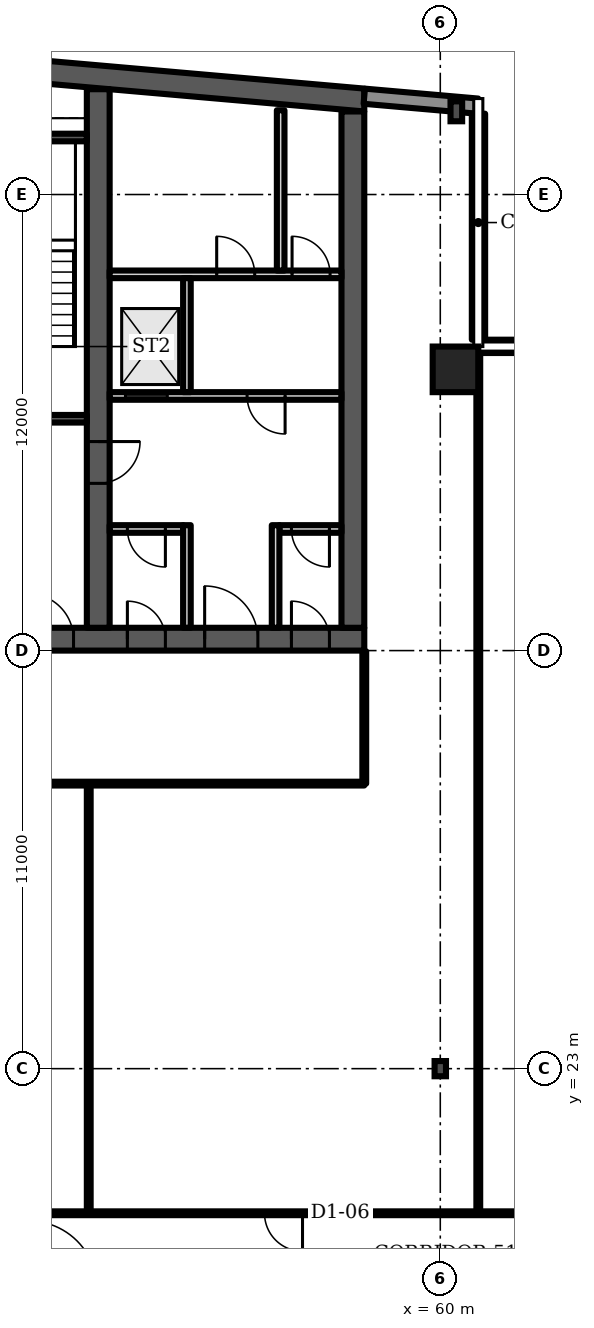
"""IFC4 building model, lengths in metres.
Left out: names, types, materials, properties, quantities, classifications, styles, units other than length and angle.
Written with IfcOpenShell. Run it as: python <this file> out.ifc"""

import sys

from ifc_helpers import new_model, si_unit, direction, frame, frame_2d, origin, origin_2d, place, context, subcontext, project, spatial, polyline, rectangle, i_section, outline, extrude, element, fill, save


model = new_model("IFC4")
c1 = context("Model", 3, precision=1e-05, world=origin(), true_north=direction((0.0, 1.0)))
c2 = subcontext(c1, "Body", "Model", "MODEL_VIEW")
j1 = project(units=[si_unit("LENGTHUNIT", "METRE"), si_unit("PLANEANGLEUNIT", "RADIAN")], contexts=[c1])
p1 = place(None, origin())
s1 = spatial("IfcSite", under=j1, at=p1, CompositionType="ELEMENT")
p2 = place(p1, origin())
s2 = spatial("IfcBuilding", under=s1, at=p2, CompositionType="ELEMENT")
p3 = place(p2, frame((0.0, 0.0, 207.1)))
s3 = spatial("IfcBuildingStorey", under=s2, at=p3, CompositionType="ELEMENT", Elevation=207.1)
p4 = place(p3, frame((0.0, 0.0, -0.0)))
e1 = element("IfcWall", 1, at=p4, inside=s3, PredefinedType="SHEAR", context=c2, shape_type="SweptSolid", body=[
    extrude(outline(polyline([(23.0, 48.185), (40.5, 49.716), (58.0, 48.185), (58.0, 48.787), (40.5, 50.318), (23.0, 48.787), (23.0, 48.185)])), origin(), (0.0, 0.0, 1.0), 3.6),
])
p5 = place(p3, frame((23.0, 34.3, 0.0), z_axis=(0.0, 0.0, 1.0), x_axis=(1.0, 0.0, 0.0)))
e2 = element("IfcWall", 2, at=p5, inside=s3, PredefinedType="SHEAR", context=c2, shape_type="SweptSolid", body=[
    extrude(rectangle(XDim=35.0, YDim=0.6, at=frame_2d((17.5, 0.0))), origin(), (0.0, 0.0, 1.0), 3.6),
])
p6 = place(p5, frame((0.65, 0.0, 0.0)))
e3 = element("IfcOpeningElement", 3, at=p6, cuts=e2, PredefinedType="OPENING", context=c2, shape_type="SweptSolid", body=[
    extrude(rectangle(XDim=1.2, YDim=2.1, at=frame_2d((0.6, 1.05))), frame((0.0, 0.31, 0.0), z_axis=(0.0, -1.0, 0.0), x_axis=(1.0, 0.0, 0.0)), (0.0, 0.0, 1.0), 0.62),
])
p7 = place(p5, frame((7.717, 0.0, 0.0)))
e4 = element("IfcOpeningElement", 4, at=p7, cuts=e2, PredefinedType="OPENING", context=c2, shape_type="SweptSolid", body=[
    extrude(rectangle(XDim=1.1, YDim=2.1, at=frame_2d((0.55, 1.05))), frame((0.0, 0.31, 0.0), z_axis=(0.0, -1.0, 0.0), x_axis=(1.0, 0.0, 0.0)), (0.0, 0.0, 1.0), 0.62),
])
p8 = place(p5, frame((12.183, 0.0, 0.0)))
e5 = element("IfcOpeningElement", 5, at=p8, cuts=e2, PredefinedType="OPENING", context=c2, shape_type="SweptSolid", body=[
    extrude(rectangle(XDim=1.1, YDim=2.1, at=frame_2d((0.55, 1.05))), frame((0.0, 0.31, 0.0), z_axis=(0.0, -1.0, 0.0), x_axis=(1.0, 0.0, 0.0)), (0.0, 0.0, 1.0), 0.62),
])
p9 = place(p5, frame((9.8, 0.0, 0.0)))
e6 = element("IfcOpeningElement", 6, at=p9, cuts=e2, PredefinedType="OPENING", context=c2, shape_type="SweptSolid", body=[
    extrude(rectangle(XDim=1.4, YDim=2.1, at=frame_2d((0.7, 1.05))), frame((0.0, 0.31, 0.0), z_axis=(0.0, -1.0, 0.0), x_axis=(1.0, 0.0, 0.0)), (0.0, 0.0, 1.0), 0.62),
])
p10 = place(p5, frame((14.717, 0.0, 0.0)))
e7 = element("IfcOpeningElement", 7, at=p10, cuts=e2, PredefinedType="OPENING", context=c2, shape_type="SweptSolid", body=[
    extrude(rectangle(XDim=1.1, YDim=2.1, at=frame_2d((0.55, 1.05))), frame((0.0, 0.31, 0.0), z_axis=(0.0, -1.0, 0.0), x_axis=(1.0, 0.0, 0.0)), (0.0, 0.0, 1.0), 0.62),
])
p11 = place(p5, frame((16.95, 0.0, 0.0)))
e8 = element("IfcOpeningElement", 8, at=p11, cuts=e2, PredefinedType="OPENING", context=c2, shape_type="SweptSolid", body=[
    extrude(rectangle(XDim=1.1, YDim=2.1, at=frame_2d((0.55, 1.05))), frame((0.0, 0.31, 0.0), z_axis=(0.0, -1.0, 0.0), x_axis=(1.0, 0.0, 0.0)), (0.0, 0.0, 1.0), 0.62),
])
p12 = place(p5, frame((19.183, 0.0, 0.0)))
e9 = element("IfcOpeningElement", 9, at=p12, cuts=e2, PredefinedType="OPENING", context=c2, shape_type="SweptSolid", body=[
    extrude(rectangle(XDim=1.1, YDim=2.1, at=frame_2d((0.55, 1.05))), frame((0.0, 0.31, 0.0), z_axis=(0.0, -1.0, 0.0), x_axis=(1.0, 0.0, 0.0)), (0.0, 0.0, 1.0), 0.62),
])
p13 = place(p5, frame((26.15, 0.0, 0.0)))
e10 = element("IfcOpeningElement", 10, at=p13, cuts=e2, PredefinedType="OPENING", context=c2, shape_type="SweptSolid", body=[
    extrude(rectangle(XDim=1.2, YDim=2.1, at=frame_2d((0.6, 1.05))), frame((0.0, 0.31, 0.0), z_axis=(0.0, -1.0, 0.0), x_axis=(1.0, 0.0, 0.0)), (0.0, 0.0, 1.0), 0.62),
])
p14 = place(p5, frame((28.767, 0.0, 0.0)))
e11 = element("IfcOpeningElement", 11, at=p14, cuts=e2, PredefinedType="OPENING", context=c2, shape_type="SweptSolid", body=[
    extrude(rectangle(XDim=1.0, YDim=2.1, at=frame_2d((0.5, 1.05))), frame((0.0, 0.31, 0.0), z_axis=(0.0, -1.0, 0.0), x_axis=(1.0, 0.0, 0.0)), (0.0, 0.0, 1.0), 0.62),
])
p15 = place(p5, frame((33.083, 0.0, 0.0)))
e12 = element("IfcOpeningElement", 12, at=p15, cuts=e2, PredefinedType="OPENING", context=c2, shape_type="SweptSolid", body=[
    extrude(rectangle(XDim=1.0, YDim=2.1, at=frame_2d((0.5, 1.05))), frame((0.0, 0.31, 0.0), z_axis=(0.0, -1.0, 0.0), x_axis=(1.0, 0.0, 0.0)), (0.0, 0.0, 1.0), 0.62),
])
p16 = place(p5, frame((30.8, 0.0, 0.0)))
e13 = element("IfcOpeningElement", 13, at=p16, cuts=e2, PredefinedType="OPENING", context=c2, shape_type="SweptSolid", body=[
    extrude(rectangle(XDim=1.4, YDim=2.1, at=frame_2d((0.7, 1.05))), frame((0.0, 0.31, 0.0), z_axis=(0.0, -1.0, 0.0), x_axis=(1.0, 0.0, 0.0)), (0.0, 0.0, 1.0), 0.62),
])
p17 = place(p3, frame((51.0, 34.6, 0.0), z_axis=(0.0, 0.0, 1.0), x_axis=(0.0, 1.0, 0.0)))
e14 = element("IfcWall", 14, at=p17, inside=s3, PredefinedType="SHEAR", context=c2, shape_type="SweptSolid", body=[
    extrude(rectangle(XDim=14.171, YDim=0.6, at=frame_2d((7.085, 0.0))), origin(), (0.0, 0.0, 1.0), 3.6),
])
p18 = place(p17, frame((3.8, 0.0, 0.0)))
e15 = element("IfcOpeningElement", 15, at=p18, cuts=e14, PredefinedType="OPENING", context=c2, shape_type="SweptSolid", body=[
    extrude(rectangle(XDim=1.1, YDim=2.1, at=frame_2d((0.55, 1.05))), frame((0.0, 0.31, 0.0), z_axis=(0.0, -1.0, 0.0), x_axis=(1.0, 0.0, 0.0)), (0.0, 0.0, 1.0), 0.62),
])
p19 = place(p3, frame((57.7, 34.6, 0.0), z_axis=(0.0, 0.0, 1.0), x_axis=(0.0, 1.0, 0.0)))
e16 = element("IfcWall", 16, at=p19, inside=s3, PredefinedType="SHEAR", context=c2, shape_type="SweptSolid", body=[
    extrude(rectangle(XDim=13.585, YDim=0.6, at=frame_2d((6.792, 0.0))), origin(), (0.0, 0.0, 1.0), 3.6),
])
p20 = place(p3, frame((60.4, 41.4, 0.0), z_axis=(0.0, 0.0, 1.0), x_axis=(1.0, 0.0, 0.0)))
e17 = element("IfcColumn", 17, at=p20, inside=s3, PredefinedType="COLUMN", context=c2, shape_type="SweptSolid", body=[
    extrude(rectangle(XDim=1.2, YDim=1.2, at=origin_2d()), origin(), (0.0, 0.0, 1.0), 3.6),
])
p21 = place(p3, frame((60.422, 48.189, 0.0), z_axis=(0.0, 0.0, 1.0), x_axis=(1.0, 0.0, 0.0)))
e18 = element("IfcColumn", 18, at=p21, inside=s3, PredefinedType="COLUMN", context=c2, shape_type="SweptSolid", body=[
    extrude(i_section(OverallWidth=0.306, OverallDepth=0.524, WebThickness=0.021, FlangeThickness=0.04, FilletRadius=0.027, at=origin_2d()), origin(), (0.0, 0.0, 1.0), 3.6),
])
p22 = place(p3, frame((60.0, 23.0, 0.0), z_axis=(0.0, 0.0, 1.0), x_axis=(1.0, 0.0, 0.0)))
e19 = element("IfcColumn", 19, at=p22, inside=s3, PredefinedType="COLUMN", context=c2, shape_type="SweptSolid", body=[
    extrude(i_section(OverallWidth=0.3, OverallDepth=0.4, WebThickness=0.013, FlangeThickness=0.024, FilletRadius=0.027, at=origin_2d()), origin(), (0.0, 0.0, 1.0), 3.6),
])
p23 = place(p3, frame((60.983, 48.326, 0.0), z_axis=(0.0, 0.0, 1.0), x_axis=(-0.996194, 0.087168, 0.0)))
e20 = element("IfcWall", 20, at=p23, inside=s3, PredefinedType="SOLIDWALL", context=c2, shape_type="SweptSolid", body=[
    extrude(rectangle(XDim=2.994, YDim=0.4, at=frame_2d((1.497, 0.0))), origin(), (0.0, 0.0, 1.0), 3.2),
])
p24 = place(p3, frame((68.803, 42.005, 0.0), z_axis=(0.0, 0.0, 1.0), x_axis=(-1.0, 0.0, 0.0)))
e21 = element("IfcWall", 21, at=p24, inside=s3, PredefinedType="SOLIDWALL", context=c2, shape_type="SweptSolid", body=[
    extrude(rectangle(XDim=7.803, YDim=0.35, at=frame_2d((3.902, 0.0))), origin(), (0.0, 0.0, 1.0), 1.0),
])
p25 = place(p3, frame((61.005, 42.18, 0.0), z_axis=(0.0, 0.0, 1.0), x_axis=(0.0, 1.0, 0.0)))
e22 = element("IfcWall", 22, at=p25, inside=s3, PredefinedType="SOLIDWALL", context=c2, shape_type="SweptSolid", body=[
    extrude(rectangle(XDim=5.947, YDim=0.35, at=frame_2d((2.973, 0.0))), origin(), (0.0, 0.0, 1.0), 1.0),
])
p26 = place(p3, frame((44.3, 40.1, 0.0), z_axis=(0.0, 0.0, 1.0), x_axis=(1.0, 0.0, 0.0)))
e23 = element("IfcWall", 23, at=p26, inside=s3, PredefinedType="SHEAR", context=c2, shape_type="SweptSolid", body=[
    extrude(rectangle(XDim=6.4, YDim=0.2, at=frame_2d((3.2, 0.0))), origin(), (0.0, 0.0, 1.0), 3.2),
])
p27 = place(p26, frame((3.625, 0.0, 0.0)))
e24 = element("IfcOpeningElement", 24, at=p27, cuts=e23, PredefinedType="OPENING", context=c2, shape_type="SweptSolid", body=[
    extrude(rectangle(XDim=1.2, YDim=2.1, at=frame_2d((0.6, 1.05))), frame((0.0, 0.11, 0.0), z_axis=(0.0, -1.0, 0.0), x_axis=(1.0, 0.0, 0.0)), (0.0, 0.0, 1.0), 0.22),
])
p28 = place(p26, frame((0.625, 0.0, 0.0)))
e25 = element("IfcOpeningElement", 25, at=p28, cuts=e23, PredefinedType="OPENING", context=c2, shape_type="SweptSolid", body=[
    extrude(rectangle(XDim=0.9, YDim=2.1, at=frame_2d((0.45, 1.05))), frame((0.0, 0.11, 0.0), z_axis=(0.0, -1.0, 0.0), x_axis=(1.0, 0.0, 0.0)), (0.0, 0.0, 1.0), 0.22),
])
p29 = place(p3, frame((46.75, 47.5, 0.0), z_axis=(0.0, 0.0, 1.0), x_axis=(1.0, 0.0, 0.0)))
e26 = element("IfcWall", 26, at=p29, inside=s3, PredefinedType="SHEAR", context=c2, shape_type="SweptSolid", body=[
    extrude(rectangle(XDim=3.95, YDim=0.2, at=frame_2d((1.975, 0.0))), origin(), (0.0, 0.0, 1.0), 3.2),
])
p30 = place(p3, frame((51.3, 37.2, 0.0), z_axis=(0.0, 0.0, 1.0), x_axis=(1.0, 0.0, 0.0)))
e27 = element("IfcWall", 27, at=p30, inside=s3, PredefinedType="PARTITIONING", context=c2, shape_type="SweptSolid", body=[
    extrude(rectangle(XDim=1.933, YDim=0.2, at=frame_2d((0.967, 0.0))), origin(), (0.0, 0.0, 1.0), 3.2),
])
p31 = place(p30, frame((0.467, 0.0, 0.0)))
e28 = element("IfcOpeningElement", 28, at=p31, cuts=e27, PredefinedType="OPENING", context=c2, shape_type="SweptSolid", body=[
    extrude(rectangle(XDim=1.0, YDim=2.1, at=frame_2d((0.5, 1.05))), frame((0.0, 0.11, 0.0), z_axis=(0.0, -1.0, 0.0), x_axis=(1.0, 0.0, 0.0)), (0.0, 0.0, 1.0), 0.22),
])
p32 = place(p3, frame((55.767, 37.2, 0.0), z_axis=(0.0, 0.0, 1.0), x_axis=(1.0, 0.0, 0.0)))
e29 = element("IfcWall", 29, at=p32, inside=s3, PredefinedType="PARTITIONING", context=c2, shape_type="SweptSolid", body=[
    extrude(rectangle(XDim=1.633, YDim=0.2, at=frame_2d((0.817, 0.0))), origin(), (0.0, 0.0, 1.0), 3.2),
])
p33 = place(p32, frame((0.317, 0.0, 0.0)))
e30 = element("IfcOpeningElement", 30, at=p33, cuts=e29, PredefinedType="OPENING", context=c2, shape_type="SweptSolid", body=[
    extrude(rectangle(XDim=1.0, YDim=2.1, at=frame_2d((0.5, 1.05))), frame((0.0, 0.11, 0.0), z_axis=(0.0, -1.0, 0.0), x_axis=(1.0, 0.0, 0.0)), (0.0, 0.0, 1.0), 0.22),
])
p34 = place(p3, frame((51.3, 40.7, 0.0), z_axis=(0.0, 0.0, 1.0), x_axis=(1.0, 0.0, 0.0)))
e31 = element("IfcWall", 31, at=p34, inside=s3, PredefinedType="PARTITIONING", context=c2, shape_type="SweptSolid", body=[
    extrude(rectangle(XDim=6.1, YDim=0.2, at=frame_2d((3.05, 0.0))), origin(), (0.0, 0.0, 1.0), 3.2),
])
p35 = place(p34, frame((0.417, 0.0, 0.0)))
e32 = element("IfcOpeningElement", 32, at=p35, cuts=e31, PredefinedType="OPENING", context=c2, shape_type="SweptSolid", body=[
    extrude(rectangle(XDim=1.1, YDim=2.1, at=frame_2d((0.55, 1.05))), frame((0.0, 0.11, 0.0), z_axis=(0.0, -1.0, 0.0), x_axis=(1.0, 0.0, 0.0)), (0.0, 0.0, 1.0), 0.22),
])
p36 = place(p34, frame((3.617, 0.0, 0.0)))
e33 = element("IfcOpeningElement", 33, at=p36, cuts=e31, PredefinedType="OPENING", context=c2, shape_type="SweptSolid", body=[
    extrude(rectangle(XDim=1.0, YDim=2.1, at=frame_2d((0.5, 1.05))), frame((0.0, 0.11, 0.0), z_axis=(0.0, -1.0, 0.0), x_axis=(1.0, 0.0, 0.0)), (0.0, 0.0, 1.0), 0.22),
])
p37 = place(p3, frame((51.3, 43.9, 0.0), z_axis=(0.0, 0.0, 1.0), x_axis=(1.0, 0.0, 0.0)))
e34 = element("IfcWall", 34, at=p37, inside=s3, PredefinedType="PARTITIONING", context=c2, shape_type="SweptSolid", body=[
    extrude(rectangle(XDim=6.1, YDim=0.2, at=frame_2d((3.05, 0.0))), origin(), (0.0, 0.0, 1.0), 3.2),
])
p38 = place(p37, frame((2.817, 0.0, 0.0)))
e35 = element("IfcOpeningElement", 35, at=p38, cuts=e34, PredefinedType="OPENING", context=c2, shape_type="SweptSolid", body=[
    extrude(rectangle(XDim=1.0, YDim=2.1, at=frame_2d((0.5, 1.05))), frame((0.0, 0.11, 0.0), z_axis=(0.0, -1.0, 0.0), x_axis=(1.0, 0.0, 0.0)), (0.0, 0.0, 1.0), 0.22),
])
p39 = place(p37, frame((4.8, 0.0, 0.0)))
e36 = element("IfcOpeningElement", 36, at=p39, cuts=e34, PredefinedType="OPENING", context=c2, shape_type="SweptSolid", body=[
    extrude(rectangle(XDim=1.0, YDim=2.1, at=frame_2d((0.5, 1.05))), frame((0.0, 0.11, 0.0), z_axis=(0.0, -1.0, 0.0), x_axis=(1.0, 0.0, 0.0)), (0.0, 0.0, 1.0), 0.22),
])
p40 = place(p3, frame((0.0, 0.0, -0.0)))
e37 = element("IfcWall", 37, at=p40, inside=s3, PredefinedType="PARTITIONING", context=c2, shape_type="SweptSolid", body=[
    extrude(outline(polyline([(53.233, 34.6), (53.233, 37.3), (53.433, 37.3), (53.433, 34.6), (53.233, 34.6)])), origin(), (0.0, 0.0, 1.0), 3.2),
])
p41 = place(p3, frame((0.0, 0.0, -0.0)))
e38 = element("IfcWall", 38, at=p41, inside=s3, PredefinedType="PARTITIONING", context=c2, shape_type="SweptSolid", body=[
    extrude(outline(polyline([(55.567, 34.6), (55.567, 37.3), (55.767, 37.3), (55.767, 34.6), (55.567, 34.6)])), origin(), (0.0, 0.0, 1.0), 3.2),
])
p42 = place(p3, frame((0.0, 0.0, -0.0)))
e39 = element("IfcWall", 39, at=p42, inside=s3, PredefinedType="PARTITIONING", context=c2, shape_type="SweptSolid", body=[
    extrude(outline(polyline([(53.433, 40.8), (53.433, 43.8), (53.233, 43.8), (53.233, 40.8), (53.433, 40.8)])), origin(), (0.0, 0.0, 1.0), 3.2),
])
p43 = place(p3, frame((55.8, 44.0, 0.0), z_axis=(0.0, 0.0, 1.0), x_axis=(0.0, 1.0, 0.0)))
e40 = element("IfcWall", 40, at=p43, inside=s3, PredefinedType="PARTITIONING", context=c2, shape_type="SweptSolid", body=[
    extrude(rectangle(XDim=4.218, YDim=0.2, at=frame_2d((2.109, 0.0))), origin(), (0.0, 0.0, 1.0), 3.2),
])
p44 = place(p3, frame((24.805, 19.195, 0.0), z_axis=(0.0, 0.0, 1.0), x_axis=(1.0, 0.0, 0.0)))
e41 = element("IfcWall", 41, at=p44, inside=s3, PredefinedType="PARTITIONING", context=c2, shape_type="SweptSolid", body=[
    extrude(rectangle(XDim=40.265, YDim=0.1, at=frame_2d((20.133, 0.0))), origin(), (0.0, 0.0, 1.0), 3.2),
])
p45 = place(p44, frame((4.945, 0.0, 0.0)))
e42 = element("IfcOpeningElement", 42, at=p45, cuts=e41, PredefinedType="OPENING", context=c2, shape_type="SweptSolid", body=[
    extrude(rectangle(XDim=1.0, YDim=2.1, at=frame_2d((0.5, 1.05))), frame((0.0, 0.06, 0.0), z_axis=(0.0, -1.0, 0.0), x_axis=(1.0, 0.0, 0.0)), (0.0, 0.0, 1.0), 0.12),
])
p46 = place(p44, frame((30.57, 0.0, 0.0)))
e43 = element("IfcOpeningElement", 43, at=p46, cuts=e41, PredefinedType="OPENING", context=c2, shape_type="SweptSolid", body=[
    extrude(rectangle(XDim=1.0, YDim=2.1, at=frame_2d((0.5, 1.05))), frame((0.0, 0.06, 0.0), z_axis=(0.0, -1.0, 0.0), x_axis=(1.0, 0.0, 0.0)), (0.0, 0.0, 1.0), 0.12),
])
p47 = place(p44, frame((16.02, 0.0, 0.0)))
e44 = element("IfcOpeningElement", 44, at=p47, cuts=e41, PredefinedType="OPENING", context=c2, shape_type="SweptSolid", body=[
    extrude(rectangle(XDim=1.1, YDim=2.1, at=frame_2d((0.55, 1.05))), frame((0.0, 0.06, 0.0), z_axis=(0.0, -1.0, 0.0), x_axis=(1.0, 0.0, 0.0)), (0.0, 0.0, 1.0), 0.12),
])
p48 = place(p3, frame((50.75, 19.2, 0.0), z_axis=(0.0, 0.0, 1.0), x_axis=(0.0, 1.0, 0.0)))
e45 = element("IfcWall", 45, at=p48, inside=s3, PredefinedType="PARTITIONING", context=c2, shape_type="SweptSolid", body=[
    extrude(rectangle(XDim=11.3, YDim=0.1, at=frame_2d((5.65, 0.0))), origin(), (0.0, 0.0, 1.0), 3.2),
])
p49 = place(p3, frame((58.0, 30.5, 0.0), z_axis=(0.0, 0.0, 1.0), x_axis=(0.0, 1.0, 0.0)))
e46 = element("IfcWall", 46, at=p49, inside=s3, PredefinedType="PARTITIONING", context=c2, shape_type="SweptSolid", body=[
    extrude(rectangle(XDim=3.48, YDim=0.1, at=frame_2d((1.74, 0.0))), origin(), (0.0, 0.0, 1.0), 3.2),
])
p50 = place(p3, frame((61.0, 19.2, 0.0), z_axis=(0.0, 0.0, 1.0), x_axis=(0.0, 1.0, 0.0)))
e47 = element("IfcWall", 47, at=p50, inside=s3, PredefinedType="PARTITIONING", context=c2, shape_type="SweptSolid", body=[
    extrude(rectangle(XDim=22.78, YDim=0.1, at=frame_2d((11.39, 0.0))), origin(), (0.0, 0.0, 1.0), 3.2),
])
p51 = place(p3, frame((44.15, 30.5, 0.0), z_axis=(0.0, 0.0, 1.0), x_axis=(1.0, 0.0, 0.0)))
e48 = element("IfcWall", 48, at=p51, inside=s3, PredefinedType="PARTITIONING", context=c2, shape_type="SweptSolid", body=[
    extrude(rectangle(XDim=13.85, YDim=0.1, at=frame_2d((6.925, 0.0))), origin(), (0.0, 0.0, 1.0), 3.2),
])
p52 = place(p51, frame((2.77, 0.0, 0.0)))
e49 = element("IfcOpeningElement", 49, at=p52, cuts=e48, PredefinedType="OPENING", context=c2, shape_type="SweptSolid", body=[
    extrude(rectangle(XDim=1.0, YDim=2.1, at=frame_2d((0.5, 1.05))), frame((0.0, 0.06, 0.0), z_axis=(0.0, -1.0, 0.0), x_axis=(1.0, 0.0, 0.0)), (0.0, 0.0, 1.0), 0.12),
])
p53 = place(p13, origin())
e50 = element("IfcDoor", 50, at=p53, inside=s3, OperationType="SINGLE_SWING_LEFT", PredefinedType="DOOR", context=c2, shape_type="SweptSolid", body=[
    extrude(rectangle(XDim=1.2, YDim=2.1, at=frame_2d((0.6, 1.05))), frame((0.0, 0.025, 0.0), z_axis=(0.0, -1.0, 0.0), x_axis=(1.0, 0.0, 0.0)), (0.0, 0.0, 1.0), 0.05),
])
fill(e10, e50)
p54 = place(p14, origin())
e51 = element("IfcDoor", 51, at=p54, inside=s3, OperationType="SINGLE_SWING_LEFT", PredefinedType="DOOR", context=c2, shape_type="SweptSolid", body=[
    extrude(rectangle(XDim=1.0, YDim=2.1, at=frame_2d((0.5, 1.05))), frame((0.0, 0.025, 0.0), z_axis=(0.0, -1.0, 0.0), x_axis=(1.0, 0.0, 0.0)), (0.0, 0.0, 1.0), 0.05),
])
fill(e11, e51)
p55 = place(p31, origin())
e52 = element("IfcDoor", 52, at=p55, inside=s3, OperationType="SINGLE_SWING_RIGHT", PredefinedType="DOOR", context=c2, shape_type="SweptSolid", body=[
    extrude(rectangle(XDim=1.0, YDim=2.1, at=frame_2d((0.5, 1.05))), frame((0.0, 0.025, 0.0), z_axis=(0.0, -1.0, 0.0), x_axis=(1.0, 0.0, 0.0)), (0.0, 0.0, 1.0), 0.05),
])
fill(e28, e52)
p56 = place(p15, origin())
e53 = element("IfcDoor", 53, at=p56, inside=s3, OperationType="SINGLE_SWING_LEFT", PredefinedType="DOOR", context=c2, shape_type="SweptSolid", body=[
    extrude(rectangle(XDim=1.0, YDim=2.1, at=frame_2d((0.5, 1.05))), frame((0.0, 0.025, 0.0), z_axis=(0.0, -1.0, 0.0), x_axis=(1.0, 0.0, 0.0)), (0.0, 0.0, 1.0), 0.05),
])
fill(e12, e53)
p57 = place(p33, origin())
e54 = element("IfcDoor", 54, at=p57, inside=s3, OperationType="SINGLE_SWING_RIGHT", PredefinedType="DOOR", context=c2, shape_type="SweptSolid", body=[
    extrude(rectangle(XDim=1.0, YDim=2.1, at=frame_2d((0.5, 1.05))), frame((0.0, 0.025, 0.0), z_axis=(0.0, -1.0, 0.0), x_axis=(1.0, 0.0, 0.0)), (0.0, 0.0, 1.0), 0.05),
])
fill(e30, e54)
p58 = place(p16, origin())
e55 = element("IfcDoor", 55, at=p58, inside=s3, OperationType="DOUBLE_DOOR_SINGLE_SWING", PredefinedType="DOOR", context=c2, shape_type="SweptSolid", body=[
    extrude(rectangle(XDim=1.4, YDim=2.1, at=frame_2d((0.7, 1.05))), frame((0.0, 0.025, 0.0), z_axis=(0.0, -1.0, 0.0), x_axis=(1.0, 0.0, 0.0)), (0.0, 0.0, 1.0), 0.05),
])
fill(e13, e55)
p59 = place(p35, origin())
e56 = element("IfcDoor", 56, at=p59, inside=s3, OperationType="DOUBLE_DOOR_SLIDING", PredefinedType="DOOR", context=c2, shape_type="SweptSolid", body=[
    extrude(rectangle(XDim=1.1, YDim=2.1, at=frame_2d((0.55, 1.05))), frame((0.0, 0.025, 0.0), z_axis=(0.0, -1.0, 0.0), x_axis=(1.0, 0.0, 0.0)), (0.0, 0.0, 1.0), 0.05),
])
fill(e32, e56)
p60 = place(p36, origin())
e57 = element("IfcDoor", 57, at=p60, inside=s3, OperationType="SINGLE_SWING_RIGHT", PredefinedType="DOOR", context=c2, shape_type="SweptSolid", body=[
    extrude(rectangle(XDim=1.0, YDim=2.1, at=frame_2d((0.5, 1.05))), frame((0.0, 0.025, 0.0), z_axis=(0.0, -1.0, 0.0), x_axis=(1.0, 0.0, 0.0)), (0.0, 0.0, 1.0), 0.05),
])
fill(e33, e57)
p61 = place(p38, origin())
e58 = element("IfcDoor", 58, at=p61, inside=s3, OperationType="SINGLE_SWING_LEFT", PredefinedType="DOOR", context=c2, shape_type="SweptSolid", body=[
    extrude(rectangle(XDim=1.0, YDim=2.1, at=frame_2d((0.5, 1.05))), frame((0.0, 0.025, 0.0), z_axis=(0.0, -1.0, 0.0), x_axis=(1.0, 0.0, 0.0)), (0.0, 0.0, 1.0), 0.05),
])
fill(e35, e58)
p62 = place(p39, origin())
e59 = element("IfcDoor", 59, at=p62, inside=s3, OperationType="SINGLE_SWING_LEFT", PredefinedType="DOOR", context=c2, shape_type="SweptSolid", body=[
    extrude(rectangle(XDim=1.0, YDim=2.1, at=frame_2d((0.5, 1.05))), frame((0.0, 0.025, 0.0), z_axis=(0.0, -1.0, 0.0), x_axis=(1.0, 0.0, 0.0)), (0.0, 0.0, 1.0), 0.05),
])
fill(e36, e59)
p63 = place(p18, origin())
e60 = element("IfcDoor", 60, at=p63, inside=s3, OperationType="SINGLE_SWING_RIGHT", PredefinedType="DOOR", context=c2, shape_type="SweptSolid", body=[
    extrude(rectangle(XDim=1.1, YDim=2.1, at=frame_2d((0.55, 1.05))), frame((0.0, 0.025, 0.0), z_axis=(0.0, -1.0, 0.0), x_axis=(1.0, 0.0, 0.0)), (0.0, 0.0, 1.0), 0.05),
])
fill(e15, e60)
p64 = place(p46, origin())
e61 = element("IfcDoor", 61, at=p64, inside=s3, OperationType="SINGLE_SWING_RIGHT", PredefinedType="DOOR", context=c2, shape_type="SweptSolid", body=[
    extrude(rectangle(XDim=1.0, YDim=2.1, at=frame_2d((0.5, 1.05))), frame((0.0, 0.025, 0.0), z_axis=(0.0, -1.0, 0.0), x_axis=(1.0, 0.0, 0.0)), (0.0, 0.0, 1.0), 0.05),
])
fill(e43, e61)
save(model, sys.argv[1])
